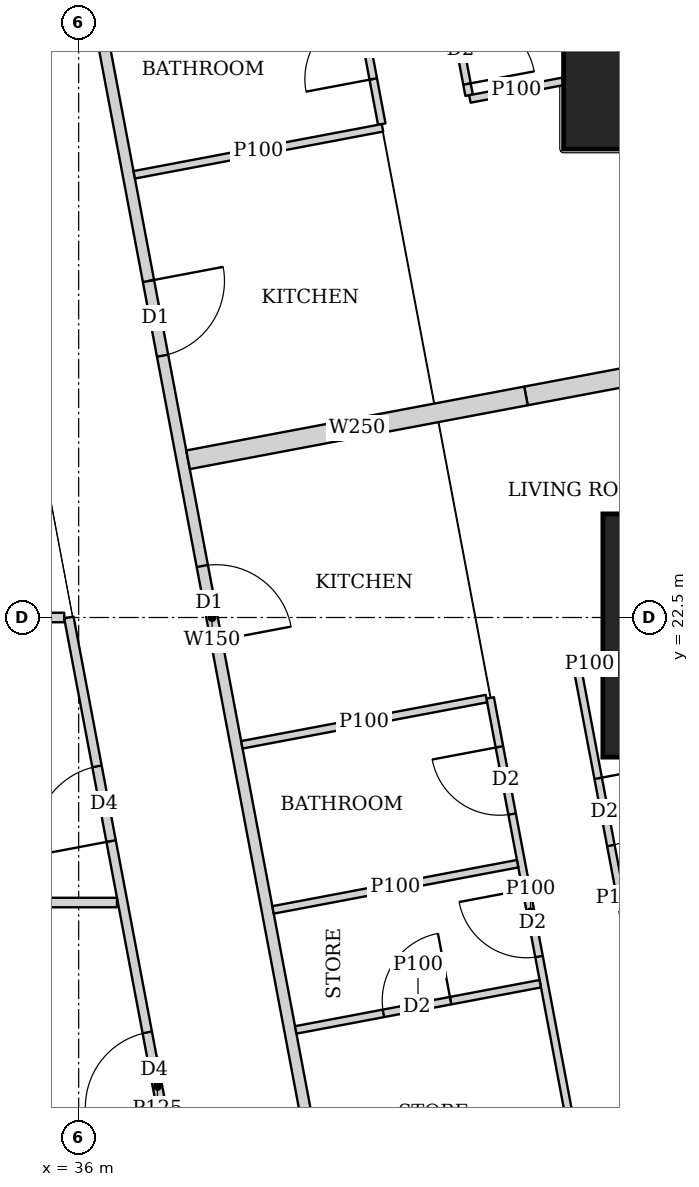
"""IFC4 building model, lengths in metres.
Left out: names, types, materials, properties, quantities, classifications, styles, units other than length and angle.
Written with IfcOpenShell. Run it as: python <this file> out.ifc"""

import sys

from ifc_helpers import new_model, si_unit, direction, frame, frame_2d, origin, origin_2d, place, context, subcontext, project, spatial, rectangle, extrude, element, fill, save


model = new_model("IFC4")
c1 = context("Model", 3, precision=1e-05, world=origin(), true_north=direction((0.0, 1.0)))
c2 = subcontext(c1, "Body", "Model", "MODEL_VIEW")
j1 = project(units=[si_unit("LENGTHUNIT", "METRE"), si_unit("PLANEANGLEUNIT", "RADIAN")], contexts=[c1])
p1 = place(None, origin())
s1 = spatial("IfcSite", under=j1, at=p1, CompositionType="ELEMENT")
p2 = place(p1, origin())
s2 = spatial("IfcBuilding", under=s1, at=p2, CompositionType="ELEMENT")
p3 = place(p2, frame((0.0, 0.0, 77.9)))
s3 = spatial("IfcBuildingStorey", under=s2, at=p3, CompositionType="ELEMENT", Elevation=77.9)
p4 = place(p3, frame((44.697, 22.263, 0.0), z_axis=(0.0, 0.0, 1.0), x_axis=(1.0, 0.0, 0.0)))
e1 = element("IfcColumn", 1, at=p4, inside=s3, PredefinedType="COLUMN", context=c2, shape_type="SweptSolid", body=[
    extrude(rectangle(XDim=3.6, YDim=3.2, at=origin_2d()), origin(), (0.0, 0.0, 1.0), 3.75),
])
p5 = place(p3, frame((43.48, 29.763, 0.0), z_axis=(0.0, 0.0, 1.0), x_axis=(1.0, 0.0, 0.0)))
e2 = element("IfcColumn", 2, at=p5, inside=s3, PredefinedType="COLUMN", context=c2, shape_type="SweptSolid", body=[
    extrude(rectangle(XDim=2.2, YDim=2.2, at=origin_2d()), origin(), (0.0, 0.0, 1.0), 3.75),
])
p6 = place(p3, frame((50.653, 2.703, 0.0), z_axis=(0.0, 0.0, 1.0), x_axis=(-0.185612026696, 0.982623109613, 0.0)))
e3 = element("IfcWall", 3, at=p6, inside=s3, PredefinedType="SOLIDWALL", context=c2, shape_type="SweptSolid", body=[
    extrude(rectangle(XDim=41.393, YDim=0.2, at=frame_2d((20.697, 0.0))), origin(), (0.0, 0.0, 1.0), 3.5),
])
p7 = place(p6, frame((1.633, 0.0, 0.9)))
e4 = element("IfcOpeningElement", 4, at=p7, cuts=e3, PredefinedType="OPENING", context=c2, shape_type="SweptSolid", body=[
    extrude(rectangle(XDim=1.8, YDim=1.5, at=frame_2d((0.9, 0.75))), frame((0.0, 0.11, 0.0), z_axis=(0.0, -1.0, 0.0), x_axis=(1.0, 0.0, 0.0)), (0.0, 0.0, 1.0), 0.22),
])
p8 = place(p6, frame((6.032, 0.0, 0.9)))
e5 = element("IfcOpeningElement", 5, at=p8, cuts=e3, PredefinedType="OPENING", context=c2, shape_type="SweptSolid", body=[
    extrude(rectangle(XDim=1.8, YDim=1.5, at=frame_2d((0.9, 0.75))), frame((0.0, 0.11, 0.0), z_axis=(0.0, -1.0, 0.0), x_axis=(1.0, 0.0, 0.0)), (0.0, 0.0, 1.0), 0.22),
])
p9 = place(p6, frame((9.848, 0.0, 0.9)))
e6 = element("IfcOpeningElement", 6, at=p9, cuts=e3, PredefinedType="OPENING", context=c2, shape_type="SweptSolid", body=[
    extrude(rectangle(XDim=1.8, YDim=1.5, at=frame_2d((0.9, 0.75))), frame((0.0, 0.11, 0.0), z_axis=(0.0, -1.0, 0.0), x_axis=(1.0, 0.0, 0.0)), (0.0, 0.0, 1.0), 0.22),
])
p10 = place(p6, frame((13.664, 0.0, 0.9)))
e7 = element("IfcOpeningElement", 7, at=p10, cuts=e3, PredefinedType="OPENING", context=c2, shape_type="SweptSolid", body=[
    extrude(rectangle(XDim=1.8, YDim=1.5, at=frame_2d((0.9, 0.75))), frame((0.0, 0.11, 0.0), z_axis=(0.0, -1.0, 0.0), x_axis=(1.0, 0.0, 0.0)), (0.0, 0.0, 1.0), 0.22),
])
p11 = place(p6, frame((17.481, 0.0, 0.9)))
e8 = element("IfcOpeningElement", 8, at=p11, cuts=e3, PredefinedType="OPENING", context=c2, shape_type="SweptSolid", body=[
    extrude(rectangle(XDim=1.8, YDim=1.5, at=frame_2d((0.9, 0.75))), frame((0.0, 0.11, 0.0), z_axis=(0.0, -1.0, 0.0), x_axis=(1.0, 0.0, 0.0)), (0.0, 0.0, 1.0), 0.22),
])
p12 = place(p6, frame((21.297, 0.0, 0.9)))
e9 = element("IfcOpeningElement", 9, at=p12, cuts=e3, PredefinedType="OPENING", context=c2, shape_type="SweptSolid", body=[
    extrude(rectangle(XDim=1.8, YDim=1.5, at=frame_2d((0.9, 0.75))), frame((0.0, 0.11, 0.0), z_axis=(0.0, -1.0, 0.0), x_axis=(1.0, 0.0, 0.0)), (0.0, 0.0, 1.0), 0.22),
])
p13 = place(p6, frame((25.113, 0.0, 0.9)))
e10 = element("IfcOpeningElement", 10, at=p13, cuts=e3, PredefinedType="OPENING", context=c2, shape_type="SweptSolid", body=[
    extrude(rectangle(XDim=1.8, YDim=1.5, at=frame_2d((0.9, 0.75))), frame((0.0, 0.11, 0.0), z_axis=(0.0, -1.0, 0.0), x_axis=(1.0, 0.0, 0.0)), (0.0, 0.0, 1.0), 0.22),
])
p14 = place(p6, frame((28.93, 0.0, 0.9)))
e11 = element("IfcOpeningElement", 11, at=p14, cuts=e3, PredefinedType="OPENING", context=c2, shape_type="SweptSolid", body=[
    extrude(rectangle(XDim=1.8, YDim=1.5, at=frame_2d((0.9, 0.75))), frame((0.0, 0.11, 0.0), z_axis=(0.0, -1.0, 0.0), x_axis=(1.0, 0.0, 0.0)), (0.0, 0.0, 1.0), 0.22),
])
p15 = place(p6, frame((32.746, 0.0, 0.9)))
e12 = element("IfcOpeningElement", 12, at=p15, cuts=e3, PredefinedType="OPENING", context=c2, shape_type="SweptSolid", body=[
    extrude(rectangle(XDim=1.8, YDim=1.5, at=frame_2d((0.9, 0.75))), frame((0.0, 0.11, 0.0), z_axis=(0.0, -1.0, 0.0), x_axis=(1.0, 0.0, 0.0)), (0.0, 0.0, 1.0), 0.22),
])
p16 = place(p6, frame((36.481, 0.0, 0.9)))
e13 = element("IfcOpeningElement", 13, at=p16, cuts=e3, PredefinedType="OPENING", context=c2, shape_type="SweptSolid", body=[
    extrude(rectangle(XDim=1.8, YDim=1.5, at=frame_2d((0.9, 0.75))), frame((0.0, 0.11, 0.0), z_axis=(0.0, -1.0, 0.0), x_axis=(1.0, 0.0, 0.0)), (0.0, 0.0, 1.0), 0.22),
])
p17 = place(p3, frame((33.382, 45.65, 0.0), z_axis=(0.0, 0.0, 1.0), x_axis=(0.185593544777, -0.982626600565, 0.0)))
e14 = element("IfcWall", 14, at=p17, inside=s3, PredefinedType="SOLIDWALL", context=c2, shape_type="SweptSolid", body=[
    extrude(rectangle(XDim=47.118, YDim=0.15, at=frame_2d((23.559, 0.0))), origin(), (0.0, 0.0, 1.0), 2.2),
])
p18 = place(p17, frame((19.054, 0.0, 0.0)))
e15 = element("IfcOpeningElement", 15, at=p18, cuts=e14, PredefinedType="OPENING", context=c2, shape_type="SweptSolid", body=[
    extrude(rectangle(XDim=1.0, YDim=2.1, at=frame_2d((0.5, 1.05))), frame((0.0, 0.085, 0.0), z_axis=(0.0, -1.0, 0.0), x_axis=(1.0, 0.0, 0.0)), (0.0, 0.0, 1.0), 0.17),
])
p19 = place(p17, frame((22.87, 0.0, 0.0)))
e16 = element("IfcOpeningElement", 16, at=p19, cuts=e14, PredefinedType="OPENING", context=c2, shape_type="SweptSolid", body=[
    extrude(rectangle(XDim=1.0, YDim=2.1, at=frame_2d((0.5, 1.05))), frame((0.0, 0.085, 0.0), z_axis=(0.0, -1.0, 0.0), x_axis=(1.0, 0.0, 0.0)), (0.0, 0.0, 1.0), 0.17),
])
p20 = place(p17, frame((33.833, 0.0, 0.0)))
e17 = element("IfcOpeningElement", 17, at=p20, cuts=e14, PredefinedType="OPENING", context=c2, shape_type="SweptSolid", body=[
    extrude(rectangle(XDim=1.0, YDim=2.1, at=frame_2d((0.5, 1.05))), frame((0.0, 0.085, 0.0), z_axis=(0.0, -1.0, 0.0), x_axis=(1.0, 0.0, 0.0)), (0.0, 0.0, 1.0), 0.17),
])
p21 = place(p3, frame((38.862, 41.42, 0.0), z_axis=(0.0, 0.0, 1.0), x_axis=(0.185529020159, -0.982638785454, 0.0)))
e18 = element("IfcWall", 18, at=p21, inside=s3, PredefinedType="PARTITIONING", context=c2, shape_type="SweptSolid", body=[
    extrude(rectangle(XDim=12.262, YDim=0.1, at=frame_2d((6.131, 0.0))), origin(), (0.0, 0.0, 1.0), 2.5),
])
p22 = place(p21, frame((11.212, 0.0, 0.0)))
e19 = element("IfcOpeningElement", 19, at=p22, cuts=e18, PredefinedType="OPENING", context=c2, shape_type="SweptSolid", body=[
    extrude(rectangle(XDim=0.9, YDim=2.1, at=frame_2d((0.45, 1.05))), frame((0.0, 0.06, 0.0), z_axis=(0.0, -1.0, 0.0), x_axis=(1.0, 0.0, 0.0)), (0.0, 0.0, 1.0), 0.12),
])
p23 = place(p21, frame((7.555, 0.0, 0.0)))
e20 = element("IfcOpeningElement", 20, at=p23, cuts=e18, PredefinedType="OPENING", context=c2, shape_type="SweptSolid", body=[
    extrude(rectangle(XDim=0.9, YDim=2.1, at=frame_2d((0.45, 1.05))), frame((0.0, 0.06, 0.0), z_axis=(0.0, -1.0, 0.0), x_axis=(1.0, 0.0, 0.0)), (0.0, 0.0, 1.0), 0.12),
])
p24 = place(p21, frame((3.579, 0.0, 0.0)))
e21 = element("IfcOpeningElement", 21, at=p24, cuts=e18, PredefinedType="OPENING", context=c2, shape_type="SweptSolid", body=[
    extrude(rectangle(XDim=0.9, YDim=2.1, at=frame_2d((0.45, 1.05))), frame((0.0, 0.06, 0.0), z_axis=(0.0, -1.0, 0.0), x_axis=(1.0, 0.0, 0.0)), (0.0, 0.0, 1.0), 0.12),
])
p25 = place(p3, frame((37.473, 42.309, 0.0), z_axis=(0.0, 0.0, 1.0), x_axis=(0.185570636839, -0.982630927024, 0.0)))
e22 = element("IfcWall", 22, at=p25, inside=s3, PredefinedType="PARTITIONING", context=c2, shape_type="SweptSolid", body=[
    extrude(rectangle(XDim=13.553, YDim=0.1, at=frame_2d((6.777, 0.0))), origin(), (0.0, 0.0, 1.0), 2.5),
])
p26 = place(p25, frame((12.049, 0.0, 0.0)))
e23 = element("IfcOpeningElement", 23, at=p26, cuts=e22, PredefinedType="OPENING", context=c2, shape_type="SweptSolid", body=[
    extrude(rectangle(XDim=0.9, YDim=2.1, at=frame_2d((0.45, 1.05))), frame((0.0, 0.06, 0.0), z_axis=(0.0, -1.0, 0.0), x_axis=(1.0, 0.0, 0.0)), (0.0, 0.0, 1.0), 0.12),
])
p27 = place(p25, frame((8.427, 0.0, 0.0)))
e24 = element("IfcOpeningElement", 24, at=p27, cuts=e22, PredefinedType="OPENING", context=c2, shape_type="SweptSolid", body=[
    extrude(rectangle(XDim=0.9, YDim=2.1, at=frame_2d((0.45, 1.05))), frame((0.0, 0.06, 0.0), z_axis=(0.0, -1.0, 0.0), x_axis=(1.0, 0.0, 0.0)), (0.0, 0.0, 1.0), 0.12),
])
p28 = place(p25, frame((2.853, 0.0, 0.0)))
e25 = element("IfcOpeningElement", 25, at=p28, cuts=e22, PredefinedType="OPENING", context=c2, shape_type="SweptSolid", body=[
    extrude(rectangle(XDim=0.9, YDim=2.1, at=frame_2d((0.45, 1.05))), frame((0.0, 0.06, 0.0), z_axis=(0.0, -1.0, 0.0), x_axis=(1.0, 0.0, 0.0)), (0.0, 0.0, 1.0), 0.12),
])
p29 = place(p25, frame((10.14, 0.0, 0.0)))
e26 = element("IfcOpeningElement", 26, at=p29, cuts=e22, PredefinedType="OPENING", context=c2, shape_type="SweptSolid", body=[
    extrude(rectangle(XDim=0.9, YDim=2.1, at=frame_2d((0.45, 1.05))), frame((0.0, 0.06, 0.0), z_axis=(0.0, -1.0, 0.0), x_axis=(1.0, 0.0, 0.0)), (0.0, 0.0, 1.0), 0.12),
])
p30 = place(p25, frame((5.759, 0.0, 0.0)))
e27 = element("IfcOpeningElement", 27, at=p30, cuts=e22, PredefinedType="OPENING", context=c2, shape_type="SweptSolid", body=[
    extrude(rectangle(XDim=0.9, YDim=2.1, at=frame_2d((0.45, 1.05))), frame((0.0, 0.06, 0.0), z_axis=(0.0, -1.0, 0.0), x_axis=(1.0, 0.0, 0.0)), (0.0, 0.0, 1.0), 0.12),
])
p31 = place(p3, frame((42.37, 29.553, 0.0), z_axis=(0.0, 0.0, 1.0), x_axis=(-0.98263602344, -0.185543648338, 0.0)))
e28 = element("IfcWall", 28, at=p31, inside=s3, PredefinedType="PARTITIONING", context=c2, shape_type="SweptSolid", body=[
    extrude(rectangle(XDim=1.245, YDim=0.1, at=frame_2d((0.623, 0.0))), origin(), (0.0, 0.0, 1.0), 2.5),
])
p32 = place(p3, frame((39.997, 28.942, 0.0), z_axis=(0.0, 0.0, 1.0), x_axis=(-0.982569883123, -0.185893584556, 0.0)))
e29 = element("IfcWall", 29, at=p32, inside=s3, PredefinedType="PARTITIONING", context=c2, shape_type="SweptSolid", body=[
    extrude(rectangle(XDim=3.324, YDim=0.1, at=frame_2d((1.662, 0.0))), origin(), (0.0, 0.0, 1.0), 3.5),
])
p33 = place(p3, frame((42.566, 21.809, 0.0), z_axis=(0.0, 0.0, 1.0), x_axis=(0.18559218796, -0.982626856832, 0.0)))
e30 = element("IfcWall", 30, at=p33, inside=s3, PredefinedType="PARTITIONING", context=c2, shape_type="SweptSolid", body=[
    extrude(rectangle(XDim=6.105, YDim=0.1, at=frame_2d((3.052, 0.0))), origin(), (0.0, 0.0, 1.0), 2.5),
])
p34 = place(p33, frame((1.45, 0.0, 0.0)))
e31 = element("IfcOpeningElement", 31, at=p34, cuts=e30, PredefinedType="OPENING", context=c2, shape_type="SweptSolid", body=[
    extrude(rectangle(XDim=0.9, YDim=2.1, at=frame_2d((0.45, 1.05))), frame((0.0, 0.06, 0.0), z_axis=(0.0, -1.0, 0.0), x_axis=(1.0, 0.0, 0.0)), (0.0, 0.0, 1.0), 0.12),
])
p35 = place(p33, frame((4.163, 0.0, 0.0)))
e32 = element("IfcOpeningElement", 32, at=p35, cuts=e30, PredefinedType="OPENING", context=c2, shape_type="SweptSolid", body=[
    extrude(rectangle(XDim=0.9, YDim=2.1, at=frame_2d((0.45, 1.05))), frame((0.0, 0.06, 0.0), z_axis=(0.0, -1.0, 0.0), x_axis=(1.0, 0.0, 0.0)), (0.0, 0.0, 1.0), 0.12),
])
p36 = place(p3, frame((41.414, 21.442, 0.0), z_axis=(0.0, 0.0, 1.0), x_axis=(0.185636022079, -0.982618576716, 0.0)))
e33 = element("IfcWall", 33, at=p36, inside=s3, PredefinedType="PARTITIONING", context=c2, shape_type="SweptSolid", body=[
    extrude(rectangle(XDim=5.731, YDim=0.1, at=frame_2d((2.866, 0.0))), origin(), (0.0, 0.0, 1.0), 3.5),
])
p37 = place(p36, frame((0.655, 0.0, 0.0)))
e34 = element("IfcOpeningElement", 34, at=p37, cuts=e33, PredefinedType="OPENING", context=c2, shape_type="SweptSolid", body=[
    extrude(rectangle(XDim=0.9, YDim=2.1, at=frame_2d((0.45, 1.05))), frame((0.0, 0.06, 0.0), z_axis=(0.0, -1.0, 0.0), x_axis=(1.0, 0.0, 0.0)), (0.0, 0.0, 1.0), 0.12),
])
p38 = place(p36, frame((2.563, 0.0, 0.0)))
e35 = element("IfcOpeningElement", 35, at=p38, cuts=e33, PredefinedType="OPENING", context=c2, shape_type="SweptSolid", body=[
    extrude(rectangle(XDim=0.9, YDim=2.1, at=frame_2d((0.45, 1.05))), frame((0.0, 0.06, 0.0), z_axis=(0.0, -1.0, 0.0), x_axis=(1.0, 0.0, 0.0)), (0.0, 0.0, 1.0), 0.12),
])
p39 = place(p3, frame((42.887, 21.921, 0.0), z_axis=(0.0, 0.0, 1.0), x_axis=(-0.982274918032, -0.187445953293, 0.0)))
e36 = element("IfcWall", 36, at=p39, inside=s3, PredefinedType="PARTITIONING", context=c2, shape_type="SweptSolid", body=[
    extrude(rectangle(XDim=0.336, YDim=0.1, at=frame_2d((0.168, 0.0))), origin(), (0.0, 0.0, 1.0), 2.5),
])
p40 = place(p3, frame((41.365, 21.433, 0.0), z_axis=(0.0, 0.0, 1.0), x_axis=(-0.982607026909, -0.185697147715, 0.0)))
e37 = element("IfcWall", 37, at=p40, inside=s3, PredefinedType="PARTITIONING", context=c2, shape_type="SweptSolid", body=[
    extrude(rectangle(XDim=3.275, YDim=0.1, at=frame_2d((1.637, 0.0))), origin(), (0.0, 0.0, 1.0), 3.5),
])
p41 = place(p3, frame((42.073, 17.682, 0.0), z_axis=(0.0, 0.0, 1.0), x_axis=(-0.982610347627, -0.185679575441, 0.0)))
e38 = element("IfcWall", 38, at=p41, inside=s3, PredefinedType="PARTITIONING", context=c2, shape_type="SweptSolid", body=[
    extrude(rectangle(XDim=3.274, YDim=0.1, at=frame_2d((1.637, 0.0))), origin(), (0.0, 0.0, 1.0), 3.5),
])
p42 = place(p41, frame((1.2, 0.0, 0.0)))
e39 = element("IfcOpeningElement", 39, at=p42, cuts=e38, PredefinedType="OPENING", context=c2, shape_type="SweptSolid", body=[
    extrude(rectangle(XDim=0.9, YDim=2.1, at=frame_2d((0.45, 1.05))), frame((0.0, 0.06, 0.0), z_axis=(0.0, -1.0, 0.0), x_axis=(1.0, 0.0, 0.0)), (0.0, 0.0, 1.0), 0.12),
])
p43 = place(p3, frame((41.775, 19.261, 0.0), z_axis=(0.0, 0.0, 1.0), x_axis=(-0.982620626894, -0.185625169636, 0.0)))
e40 = element("IfcWall", 40, at=p43, inside=s3, PredefinedType="PARTITIONING", context=c2, shape_type="SweptSolid", body=[
    extrude(rectangle(XDim=3.275, YDim=0.1, at=frame_2d((1.637, 0.0))), origin(), (0.0, 0.0, 1.0), 3.5),
])
p44 = place(p3, frame((46.11, 26.213, 0.0), z_axis=(0.0, 0.0, 1.0), x_axis=(-0.982633535512, -0.185556823879, 0.0)))
e41 = element("IfcWall", 41, at=p44, inside=s3, PredefinedType="SOLIDWALL", context=c2, shape_type="SweptSolid", body=[
    extrude(rectangle(XDim=4.3, YDim=0.25, at=frame_2d((2.15, 0.0))), origin(), (0.0, 0.0, 1.0), 2.2),
])
p45 = place(p3, frame((41.885, 25.415, 0.0), z_axis=(0.0, 0.0, 1.0), x_axis=(-0.982612837616, -0.185666398014, 0.0)))
e42 = element("IfcWall", 42, at=p45, inside=s3, PredefinedType="SOLIDWALL", context=c2, shape_type="SweptSolid", body=[
    extrude(rectangle(XDim=4.525, YDim=0.25, at=frame_2d((2.262, 0.0))), origin(), (0.0, 0.0, 1.0), 3.5),
])
p46 = place(p3, frame((38.202, 10.163, 0.0), z_axis=(0.0, 0.0, 1.0), x_axis=(-0.185645577403, 0.982616771479, 0.0)))
e43 = element("IfcWall", 43, at=p46, inside=s3, PredefinedType="PARTITIONING", context=c2, shape_type="SweptSolid", body=[
    extrude(rectangle(XDim=12.555, YDim=0.125, at=frame_2d((6.278, 0.0))), origin(), (0.0, 0.0, 1.0), 2.5),
])
p47 = place(p46, frame((0.708, 0.0, 0.0)))
e44 = element("IfcOpeningElement", 44, at=p47, cuts=e43, PredefinedType="OPENING", context=c2, shape_type="SweptSolid", body=[
    extrude(rectangle(XDim=1.0, YDim=2.1, at=frame_2d((0.5, 1.05))), frame((0.0, 0.073, 0.0), z_axis=(0.0, -1.0, 0.0), x_axis=(1.0, 0.0, 0.0)), (0.0, 0.0, 1.0), 0.145),
])
p48 = place(p46, frame((6.0, 0.0, 0.0)))
e45 = element("IfcOpeningElement", 45, at=p48, cuts=e43, PredefinedType="OPENING", context=c2, shape_type="SweptSolid", body=[
    extrude(rectangle(XDim=1.0, YDim=2.1, at=frame_2d((0.5, 1.05))), frame((0.0, 0.073, 0.0), z_axis=(0.0, -1.0, 0.0), x_axis=(1.0, 0.0, 0.0)), (0.0, 0.0, 1.0), 0.145),
])
p49 = place(p46, frame((9.562, 0.0, 0.0)))
e46 = element("IfcOpeningElement", 46, at=p49, cuts=e43, PredefinedType="OPENING", context=c2, shape_type="SweptSolid", body=[
    extrude(rectangle(XDim=1.0, YDim=2.1, at=frame_2d((0.5, 1.05))), frame((0.0, 0.073, 0.0), z_axis=(0.0, -1.0, 0.0), x_axis=(1.0, 0.0, 0.0)), (0.0, 0.0, 1.0), 0.145),
])
p50 = place(p3, frame((29.25, 18.75, 0.0), z_axis=(0.0, 0.0, 1.0), x_axis=(1.0, 0.0, 0.0)))
e47 = element("IfcWall", 47, at=p50, inside=s3, PredefinedType="PARTITIONING", context=c2, shape_type="SweptSolid", body=[
    extrude(rectangle(XDim=7.254, YDim=0.125, at=frame_2d((3.627, 0.0))), origin(), (0.0, 0.0, 1.0), 3.5),
])
p51 = place(p3, frame((33.801, 22.5, 0.0), z_axis=(0.0, 0.0, 1.0), x_axis=(1.0, 0.0, 0.0)))
e48 = element("IfcWall", 48, at=p51, inside=s3, PredefinedType="PARTITIONING", context=c2, shape_type="SweptSolid", body=[
    extrude(rectangle(XDim=2.009, YDim=0.125, at=frame_2d((1.004, 0.0))), origin(), (0.0, 0.0, 1.0), 2.5),
])
p52 = place(p22, origin())
e49 = element("IfcDoor", 49, at=p52, inside=s3, OperationType="SINGLE_SWING_RIGHT", PredefinedType="DOOR", context=c2, shape_type="SweptSolid", body=[
    extrude(rectangle(XDim=0.9, YDim=2.1, at=frame_2d((0.45, 1.05))), frame((0.0, 0.025, 0.0), z_axis=(0.0, -1.0, 0.0), x_axis=(1.0, 0.0, 0.0)), (0.0, 0.0, 1.0), 0.05),
])
fill(e19, e49)
p53 = place(p26, origin())
e50 = element("IfcDoor", 50, at=p53, inside=s3, OperationType="SINGLE_SWING_LEFT", PredefinedType="DOOR", context=c2, shape_type="SweptSolid", body=[
    extrude(rectangle(XDim=0.9, YDim=2.1, at=frame_2d((0.45, 1.05))), frame((0.0, 0.025, 0.0), z_axis=(0.0, -1.0, 0.0), x_axis=(1.0, 0.0, 0.0)), (0.0, 0.0, 1.0), 0.05),
])
fill(e23, e50)
p54 = place(p18, origin())
e51 = element("IfcDoor", 51, at=p54, inside=s3, OperationType="SINGLE_SWING_LEFT", PredefinedType="DOOR", context=c2, shape_type="SweptSolid", body=[
    extrude(rectangle(XDim=1.0, YDim=2.1, at=frame_2d((0.5, 1.05))), frame((0.0, 0.025, 0.0), z_axis=(0.0, -1.0, 0.0), x_axis=(1.0, 0.0, 0.0)), (0.0, 0.0, 1.0), 0.05),
])
fill(e15, e51)
p55 = place(p34, origin())
e52 = element("IfcDoor", 52, at=p55, inside=s3, OperationType="SINGLE_SWING_LEFT", PredefinedType="DOOR", context=c2, shape_type="SweptSolid", body=[
    extrude(rectangle(XDim=0.9, YDim=2.1, at=frame_2d((0.45, 1.05))), frame((0.0, 0.025, 0.0), z_axis=(0.0, -1.0, 0.0), x_axis=(1.0, 0.0, 0.0)), (0.0, 0.0, 1.0), 0.05),
])
fill(e31, e52)
p56 = place(p37, origin())
e53 = element("IfcDoor", 53, at=p56, inside=s3, OperationType="SINGLE_SWING_RIGHT", PredefinedType="DOOR", context=c2, shape_type="SweptSolid", body=[
    extrude(rectangle(XDim=0.9, YDim=2.1, at=frame_2d((0.45, 1.05))), frame((0.0, 0.025, 0.0), z_axis=(0.0, -1.0, 0.0), x_axis=(1.0, 0.0, 0.0)), (0.0, 0.0, 1.0), 0.05),
])
fill(e34, e53)
p57 = place(p38, origin())
e54 = element("IfcDoor", 54, at=p57, inside=s3, OperationType="SINGLE_SWING_RIGHT", PredefinedType="DOOR", context=c2, shape_type="SweptSolid", body=[
    extrude(rectangle(XDim=0.9, YDim=2.1, at=frame_2d((0.45, 1.05))), frame((0.0, 0.025, 0.0), z_axis=(0.0, -1.0, 0.0), x_axis=(1.0, 0.0, 0.0)), (0.0, 0.0, 1.0), 0.05),
])
fill(e35, e54)
p58 = place(p19, origin())
e55 = element("IfcDoor", 55, at=p58, inside=s3, OperationType="SINGLE_SWING_RIGHT", PredefinedType="DOOR", context=c2, shape_type="SweptSolid", body=[
    extrude(rectangle(XDim=1.0, YDim=2.1, at=frame_2d((0.5, 1.05))), frame((0.0, 0.025, 0.0), z_axis=(0.0, -1.0, 0.0), x_axis=(1.0, 0.0, 0.0)), (0.0, 0.0, 1.0), 0.05),
])
fill(e16, e55)
p59 = place(p42, origin())
e56 = element("IfcDoor", 56, at=p59, inside=s3, OperationType="SINGLE_SWING_RIGHT", PredefinedType="DOOR", context=c2, shape_type="SweptSolid", body=[
    extrude(rectangle(XDim=0.9, YDim=2.1, at=frame_2d((0.45, 1.05))), frame((0.0, 0.025, 0.0), z_axis=(0.0, -1.0, 0.0), x_axis=(1.0, 0.0, 0.0)), (0.0, 0.0, 1.0), 0.05),
])
fill(e39, e56)
p60 = place(p48, origin())
e57 = element("IfcDoor", 57, at=p60, inside=s3, OperationType="SINGLE_SWING_LEFT", PredefinedType="DOOR", context=c2, shape_type="SweptSolid", body=[
    extrude(rectangle(XDim=1.0, YDim=2.1, at=frame_2d((0.5, 1.05))), frame((0.0, 0.025, 0.0), z_axis=(0.0, -1.0, 0.0), x_axis=(1.0, 0.0, 0.0)), (0.0, 0.0, 1.0), 0.05),
])
fill(e45, e57)
p61 = place(p49, origin())
e58 = element("IfcDoor", 58, at=p61, inside=s3, OperationType="SINGLE_SWING_LEFT", PredefinedType="DOOR", context=c2, shape_type="SweptSolid", body=[
    extrude(rectangle(XDim=1.0, YDim=2.1, at=frame_2d((0.5, 1.05))), frame((0.0, 0.025, 0.0), z_axis=(0.0, -1.0, 0.0), x_axis=(1.0, 0.0, 0.0)), (0.0, 0.0, 1.0), 0.05),
])
fill(e46, e58)
save(model, sys.argv[1])
